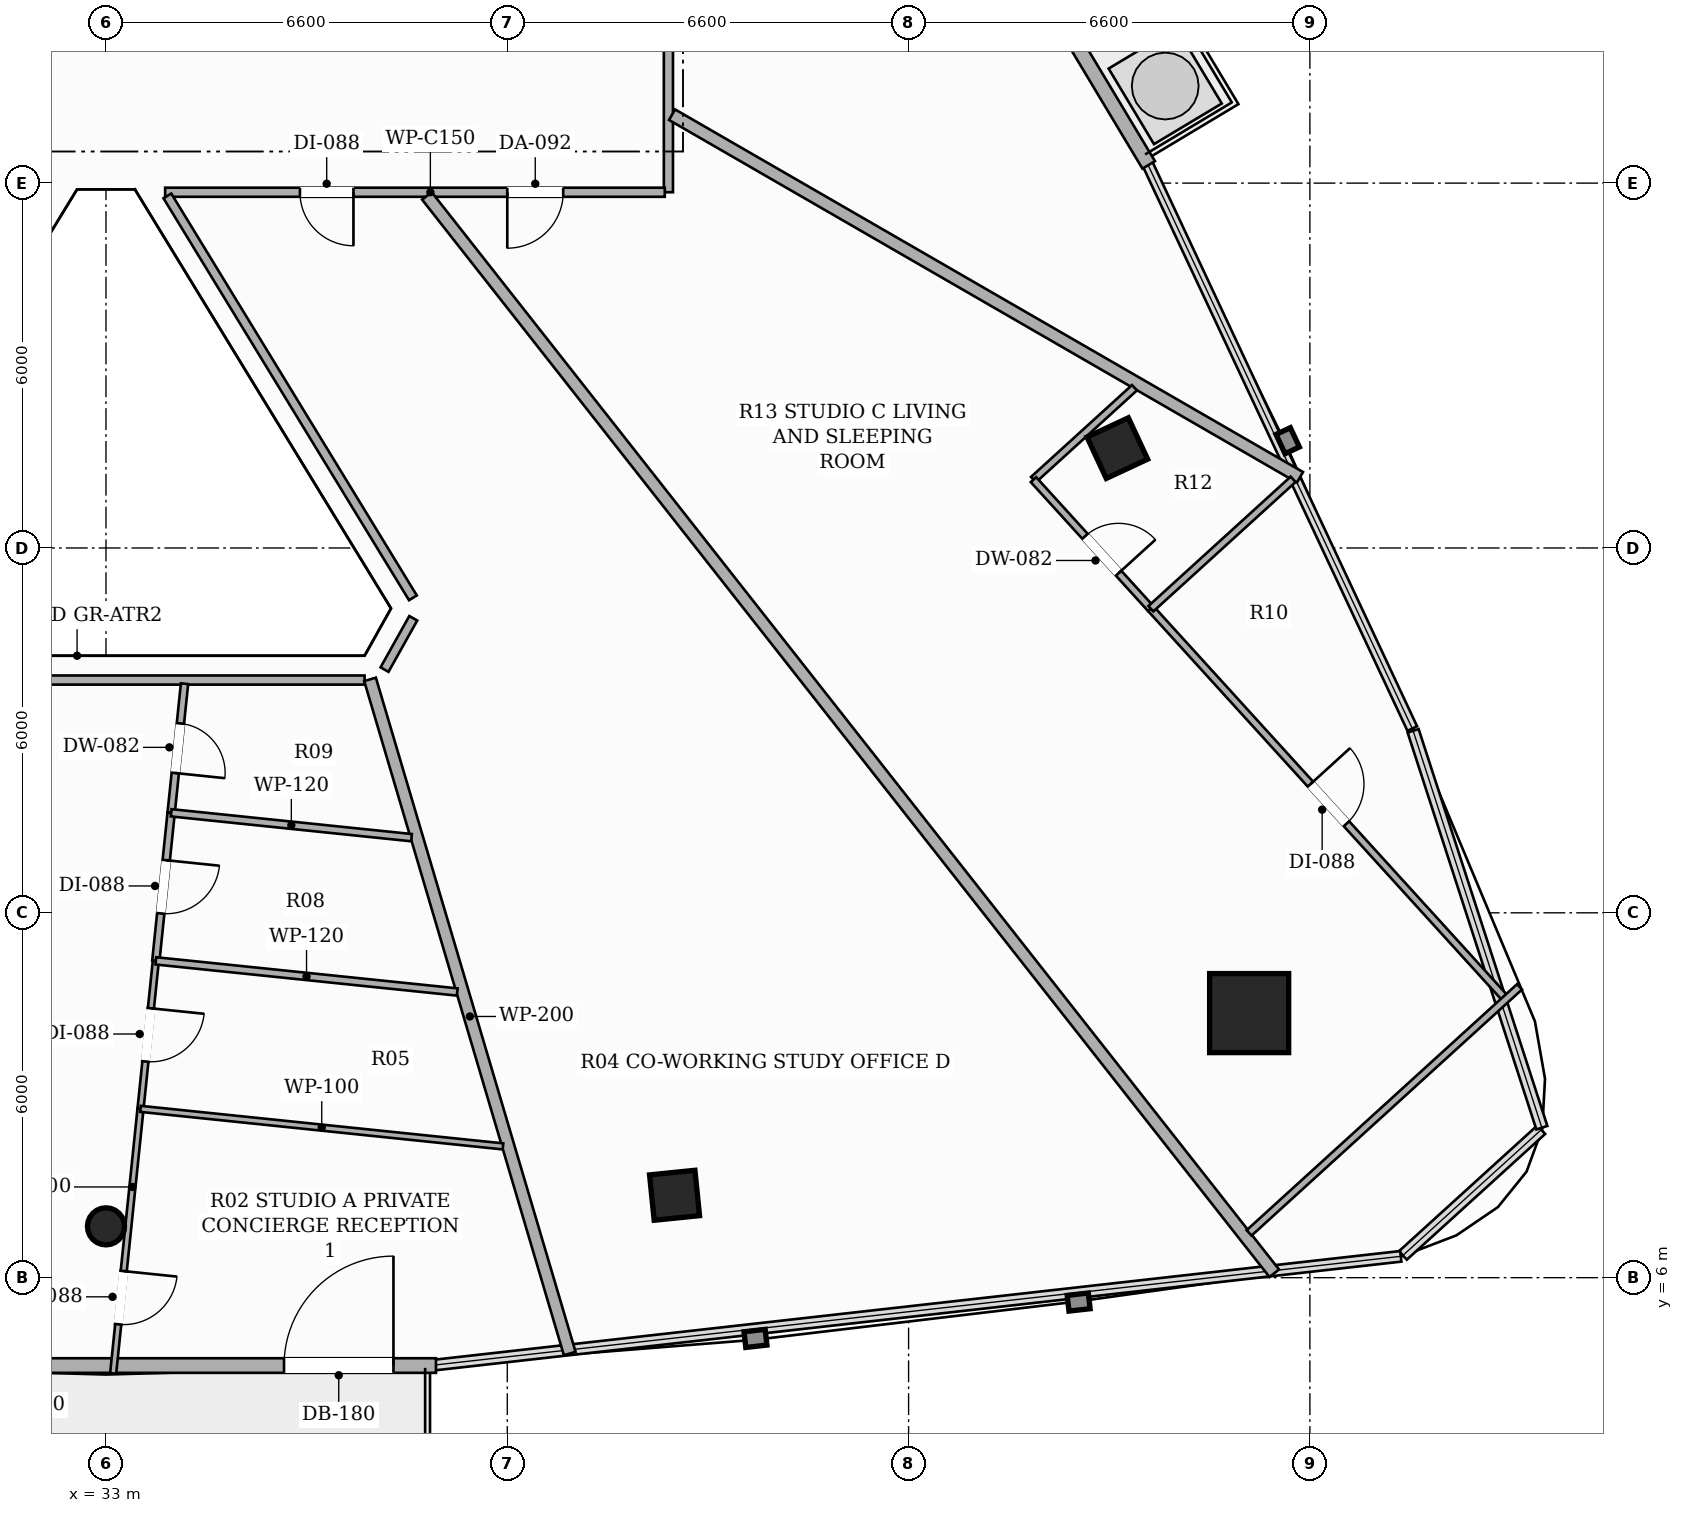
"""IFC4 building model, lengths in metres.
Left out: names, types, materials, properties, quantities, classifications, styles, units other than length and angle.
Written with IfcOpenShell. Run it as: python <this file> out.ifc"""

import sys

from ifc_helpers import new_model, si_unit, direction, frame, frame_2d, origin, origin_2d, place, context, subcontext, project, spatial, rectangle, hollow_rectangle, hollow_circle, extrude, element, fill, save


model = new_model("IFC4")
c1 = context("Model", 3, precision=1e-05, world=origin(), true_north=direction((0.0, 1.0)))
c2 = subcontext(c1, "Body", "Model", "MODEL_VIEW")
j1 = project(units=[si_unit("LENGTHUNIT", "METRE"), si_unit("PLANEANGLEUNIT", "RADIAN")], contexts=[c1])
p1 = place(None, origin())
s1 = spatial("IfcSite", under=j1, at=p1, CompositionType="ELEMENT")
p2 = place(p1, origin())
s2 = spatial("IfcBuilding", under=s1, at=p2, CompositionType="ELEMENT")
p3 = place(p2, frame((0.0, 0.0, 199.7)))
s3 = spatial("IfcBuildingStorey", under=s2, at=p3, CompositionType="ELEMENT", Elevation=199.7)
p4 = place(p3, frame((51.801, 10.351, 0.0), z_axis=(0.0, 0.0, 1.0), x_axis=(1.0, 0.0, 0.0)))
e1 = element("IfcColumn", 1, at=p4, inside=s3, PredefinedType="COLUMN", context=c2, shape_type="SweptSolid", body=[
    extrude(hollow_rectangle(XDim=1.3, YDim=1.3, WallThickness=0.04, at=origin_2d()), origin(), (0.0, 0.0, 1.0), 3.3),
])
p5 = place(p3, frame((33.0, 6.844, 0.0), z_axis=(0.0, 0.0, 1.0), x_axis=(1.0, 0.0, 0.0)))
e2 = element("IfcColumn", 2, at=p5, inside=s3, PredefinedType="COLUMN", context=c2, shape_type="SweptSolid", body=[
    extrude(hollow_circle(Radius=0.305, WallThickness=0.016, at=origin_2d()), origin(), (0.0, 0.0, 1.0), 3.3),
])
for number, where, z_axis, x_axis in (
    (3, (42.351, 7.355, 0.0), (0.0, 0.0, 1.0), (0.995, 0.101, 0.0)),
    (4, (49.633, 19.642, 0.0), (0.0, 0.0, 1.0), (-0.423, 0.906, 0.0)),
):
    element("IfcColumn", number, at=place(p3, frame(where, z_axis=z_axis, x_axis=x_axis)), inside=s3, PredefinedType="COLUMN", context=c2, shape_type="SweptSolid", body=[
        extrude(hollow_rectangle(XDim=0.75, YDim=0.75, WallThickness=0.025, at=origin_2d()), origin(), (0.0, 0.0, 1.0), 3.3),
    ])
p6 = place(p3, frame((27.573, 4.555, 0.0), z_axis=(0.0, 0.0, 1.0), x_axis=(1.0, 0.0, 0.0)))
e5 = element("IfcWall", 5, at=p6, inside=s3, PredefinedType="SOLIDWALL", context=c2, shape_type="SweptSolid", body=[
    extrude(rectangle(XDim=10.854, YDim=0.24, at=frame_2d((5.427, 0.0))), origin(), (0.0, 0.0, 1.0), 2.624),
])
p7 = place(p6, frame((8.355, 0.0, 0.0)))
e6 = element("IfcOpeningElement", 6, at=p7, cuts=e5, PredefinedType="OPENING", context=c2, shape_type="SweptSolid", body=[
    extrude(rectangle(XDim=1.8, YDim=2.2, at=frame_2d((0.9, 1.1))), frame((0.0, 0.13, 0.0), z_axis=(0.0, -1.0, 0.0), x_axis=(1.0, 0.0, 0.0)), (0.0, 0.0, 1.0), 0.26),
])
p8 = place(p3, frame((50.149, 24.3, 0.0), z_axis=(0.0, 0.0, 1.0), x_axis=(-0.514406779101, 0.857546305231, 0.0)))
e7 = element("IfcWall", 7, at=p8, inside=s3, PredefinedType="SOLIDWALL", context=c2, shape_type="SweptSolid", body=[
    extrude(rectangle(XDim=10.492, YDim=0.24, at=frame_2d((5.246, 0.0))), origin(), (0.0, 0.0, 1.0), 2.624),
])
p9 = place(p8, frame((7.994, 0.0, 0.0)))
e8 = element("IfcOpeningElement", 8, at=p9, cuts=e7, PredefinedType="OPENING", context=c2, shape_type="SweptSolid", body=[
    extrude(rectangle(XDim=1.8, YDim=2.2, at=frame_2d((0.9, 1.1))), frame((0.0, 0.13, 0.0), z_axis=(0.0, -1.0, 0.0), x_axis=(1.0, 0.0, 0.0)), (0.0, 0.0, 1.0), 0.26),
])
p10 = place(p3, frame((42.25, 26.59, 0.0), z_axis=(0.0, 0.0, 1.0), x_axis=(0.0, -1.0, 0.0)))
e9 = element("IfcWall", 9, at=p10, inside=s3, PredefinedType="PARTITIONING", context=c2, shape_type="SweptSolid", body=[
    extrude(rectangle(XDim=2.74, YDim=0.15, at=frame_2d((1.37, 0.0))), origin(), (0.0, 0.0, 1.0), 2.773),
])
p11 = place(p3, frame((42.19, 23.85, 0.0), z_axis=(0.0, 0.0, 1.0), x_axis=(-1.0, 0.0, 0.0)))
e10 = element("IfcWall", 10, at=p11, inside=s3, PredefinedType="PARTITIONING", context=c2, shape_type="SweptSolid", body=[
    extrude(rectangle(XDim=8.217, YDim=0.15, at=frame_2d((4.108, 0.0))), origin(), (0.0, 0.0, 1.0), 2.565),
])
p12 = place(p11, frame((1.67, 0.0, 0.0)))
e11 = element("IfcOpeningElement", 11, at=p12, cuts=e10, PredefinedType="OPENING", context=c2, shape_type="SweptSolid", body=[
    extrude(rectangle(XDim=0.92, YDim=2.15, at=frame_2d((0.46, 1.075))), frame((0.0, 0.085, 0.0), z_axis=(0.0, -1.0, 0.0), x_axis=(1.0, 0.0, 0.0)), (0.0, 0.0, 1.0), 0.17),
])
p13 = place(p11, frame((5.12, 0.0, 0.0)))
e12 = element("IfcOpeningElement", 12, at=p13, cuts=e10, PredefinedType="OPENING", context=c2, shape_type="SweptSolid", body=[
    extrude(rectangle(XDim=0.88, YDim=2.1, at=frame_2d((0.44, 1.05))), frame((0.0, 0.085, 0.0), z_axis=(0.0, -1.0, 0.0), x_axis=(1.0, 0.0, 0.0)), (0.0, 0.0, 1.0), 0.17),
])
p14 = place(p3, frame((34.01, 23.79, 0.0), z_axis=(0.0, 0.0, 1.0), x_axis=(0.521316137909, -0.853363629618, 0.0)))
e13 = element("IfcWall", 13, at=p14, inside=s3, PredefinedType="PARTITIONING", context=c2, shape_type="SweptSolid", body=[
    extrude(rectangle(XDim=7.746, YDim=0.15, at=frame_2d((3.873, 0.0))), origin(), (0.0, 0.0, 1.0), 2.773),
])
p15 = place(p3, frame((38.054, 16.844, 0.0), z_axis=(0.0, 0.0, 1.0), x_axis=(-0.488810833005, -0.872389803664, 0.0)))
e14 = element("IfcWall", 14, at=p15, inside=s3, PredefinedType="PARTITIONING", context=c2, shape_type="SweptSolid", body=[
    extrude(rectangle(XDim=0.968, YDim=0.15, at=frame_2d((0.484, 0.0))), origin(), (0.0, 0.0, 1.0), 3.06),
])
p16 = place(p3, frame((37.253, 15.828, 0.0), z_axis=(0.0, 0.0, 1.0), x_axis=(-1.0, 0.0, 0.0)))
e15 = element("IfcWall", 15, at=p16, inside=s3, PredefinedType="PARTITIONING", context=c2, shape_type="SweptSolid", body=[
    extrude(rectangle(XDim=8.506, YDim=0.15, at=frame_2d((4.253, 0.0))), origin(), (0.0, 0.0, 1.0), 2.773),
])
p17 = place(p3, frame((37.343, 15.839, 0.0), z_axis=(0.0, 0.0, 1.0), x_axis=(0.28399703203, -0.958825159139, 0.0)))
e16 = element("IfcWall", 16, at=p17, inside=s3, PredefinedType="PARTITIONING", context=c2, shape_type="SweptSolid", body=[
    extrude(rectangle(XDim=11.563, YDim=0.2, at=frame_2d((5.782, 0.0))), origin(), (0.0, 0.0, 1.0), 2.492),
])
p18 = place(p3, frame((52.214, 6.073, 0.0), z_axis=(0.0, 0.0, 1.0), x_axis=(-0.618246700658, 0.785984107425, 0.0)))
e17 = element("IfcWall", 17, at=p18, inside=s3, PredefinedType="PARTITIONING", context=c2, shape_type="SweptSolid", body=[
    extrude(rectangle(XDim=22.541, YDim=0.2, at=frame_2d((11.271, 0.0))), origin(), (0.0, 0.0, 1.0), 2.492),
])
p19 = place(p3, frame((42.31, 25.125, 0.0), z_axis=(0.0, 0.0, 1.0), x_axis=(0.866001812803, -0.500040858552, 0.0)))
e18 = element("IfcWall", 18, at=p19, inside=s3, PredefinedType="PARTITIONING", context=c2, shape_type="SweptSolid", body=[
    extrude(rectangle(XDim=11.925, YDim=0.2, at=frame_2d((5.962, 0.0))), origin(), (0.0, 0.0, 1.0), 2.492),
])
p20 = place(p3, frame((34.292, 15.768, 0.0), z_axis=(0.0, 0.0, 1.0), x_axis=(-0.103059151492, -0.994675229054, 0.0)))
e19 = element("IfcWall", 19, at=p20, inside=s3, PredefinedType="PARTITIONING", context=c2, shape_type="SweptSolid", body=[
    extrude(rectangle(XDim=2.135, YDim=0.12, at=frame_2d((1.067, 0.0))), origin(), (0.0, 0.0, 1.0), 3.06),
])
p21 = place(p20, frame((0.657, 0.0, 0.0)))
e20 = element("IfcOpeningElement", 20, at=p21, cuts=e19, PredefinedType="OPENING", context=c2, shape_type="SweptSolid", body=[
    extrude(rectangle(XDim=0.82, YDim=2.1, at=frame_2d((0.41, 1.05))), frame((0.0, 0.07, 0.0), z_axis=(0.0, -1.0, 0.0), x_axis=(1.0, 0.0, 0.0)), (0.0, 0.0, 1.0), 0.14),
])
p22 = place(p3, frame((34.072, 13.645, 0.0), z_axis=(0.0, 0.0, 1.0), x_axis=(-0.102919566026, -0.994689681724, 0.0)))
e21 = element("IfcWall", 21, at=p22, inside=s3, PredefinedType="PARTITIONING", context=c2, shape_type="SweptSolid", body=[
    extrude(rectangle(XDim=2.448, YDim=0.12, at=frame_2d((1.224, 0.0))), origin(), (0.0, 0.0, 1.0), 3.06),
])
p23 = place(p22, frame((0.784, 0.0, 0.0)))
e22 = element("IfcOpeningElement", 22, at=p23, cuts=e21, PredefinedType="OPENING", context=c2, shape_type="SweptSolid", body=[
    extrude(rectangle(XDim=0.88, YDim=2.1, at=frame_2d((0.44, 1.05))), frame((0.0, 0.07, 0.0), z_axis=(0.0, -1.0, 0.0), x_axis=(1.0, 0.0, 0.0)), (0.0, 0.0, 1.0), 0.14),
])
p24 = place(p3, frame((33.568, 8.776, 0.0), z_axis=(0.0, 0.0, 1.0), x_axis=(-0.1029239069, -0.994689232569, 0.0)))
e23 = element("IfcWall", 23, at=p24, inside=s3, PredefinedType="PARTITIONING", context=c2, shape_type="SweptSolid", body=[
    extrude(rectangle(XDim=4.374, YDim=0.1, at=frame_2d((2.187, 0.0))), origin(), (0.0, 0.0, 1.0), 2.492),
])
p25 = place(p24, frame((2.682, 0.0, 0.0)))
e24 = element("IfcOpeningElement", 24, at=p25, cuts=e23, PredefinedType="OPENING", context=c2, shape_type="SweptSolid", body=[
    extrude(rectangle(XDim=0.88, YDim=2.1, at=frame_2d((0.44, 1.05))), frame((0.0, 0.06, 0.0), z_axis=(0.0, -1.0, 0.0), x_axis=(1.0, 0.0, 0.0)), (0.0, 0.0, 1.0), 0.12),
])
p26 = place(p3, frame((33.82, 11.21, 0.0), z_axis=(0.0, 0.0, 1.0), x_axis=(-0.102960420087, -0.994685453747, 0.0)))
e25 = element("IfcWall", 25, at=p26, inside=s3, PredefinedType="PARTITIONING", context=c2, shape_type="SweptSolid", body=[
    extrude(rectangle(XDim=2.447, YDim=0.1, at=frame_2d((1.224, 0.0))), origin(), (0.0, 0.0, 1.0), 3.06),
])
p27 = place(p26, frame((0.784, 0.0, 0.0)))
e26 = element("IfcOpeningElement", 26, at=p27, cuts=e25, PredefinedType="OPENING", context=c2, shape_type="SweptSolid", body=[
    extrude(rectangle(XDim=0.88, YDim=2.1, at=frame_2d((0.44, 1.05))), frame((0.0, 0.06, 0.0), z_axis=(0.0, -1.0, 0.0), x_axis=(1.0, 0.0, 0.0)), (0.0, 0.0, 1.0), 0.12),
])
p28 = place(p3, frame((38.025, 13.236, 0.0), z_axis=(0.0, 0.0, 1.0), x_axis=(-0.99469136016, 0.102903343108, 0.0)))
e27 = element("IfcWall", 27, at=p28, inside=s3, PredefinedType="PARTITIONING", context=c2, shape_type="SweptSolid", body=[
    extrude(rectangle(XDim=3.974, YDim=0.12, at=frame_2d((1.987, 0.0))), origin(), (0.0, 0.0, 1.0), 2.773),
])
p29 = place(p3, frame((38.777, 10.698, 0.0), z_axis=(0.0, 0.0, 1.0), x_axis=(-0.994708898019, 0.102733676081, 0.0)))
e28 = element("IfcWall", 28, at=p29, inside=s3, PredefinedType="PARTITIONING", context=c2, shape_type="SweptSolid", body=[
    extrude(rectangle(XDim=4.983, YDim=0.12, at=frame_2d((2.492, 0.0))), origin(), (0.0, 0.0, 1.0), 2.773),
])
p30 = place(p3, frame((33.568, 8.776, 0.0), z_axis=(0.0, 0.0, 1.0), x_axis=(0.994686760155, -0.102947798284, 0.0)))
e29 = element("IfcWall", 29, at=p30, inside=s3, PredefinedType="PARTITIONING", context=c2, shape_type="SweptSolid", body=[
    extrude(rectangle(XDim=5.993, YDim=0.1, at=frame_2d((2.996, 0.0))), origin(), (0.0, 0.0, 1.0), 2.773),
])
p31 = place(p3, frame((49.915, 20.635, 0.0), z_axis=(0.0, 0.0, 1.0), x_axis=(-0.739748179987, -0.672883816276, 0.0)))
e30 = element("IfcWall", 30, at=p31, inside=s3, PredefinedType="PARTITIONING", context=c2, shape_type="SweptSolid", body=[
    extrude(rectangle(XDim=2.246, YDim=0.12, at=frame_2d((1.123, 0.0))), origin(), (0.0, 0.0, 1.0), 2.492),
])
p32 = place(p3, frame((48.254, 19.124, 0.0), z_axis=(0.0, 0.0, 1.0), x_axis=(0.672884473084, -0.739747582546, 0.0)))
e31 = element("IfcWall", 31, at=p32, inside=s3, PredefinedType="PARTITIONING", context=c2, shape_type="SweptSolid", body=[
    extrude(rectangle(XDim=2.87, YDim=0.12, at=frame_2d((1.435, 0.0))), origin(), (0.0, 0.0, 1.0), 2.492),
])
p33 = place(p32, frame((1.26, 0.0, 0.0)))
e32 = element("IfcOpeningElement", 32, at=p33, cuts=e31, PredefinedType="OPENING", context=c2, shape_type="SweptSolid", body=[
    extrude(rectangle(XDim=0.82, YDim=2.1, at=frame_2d((0.41, 1.05))), frame((0.0, 0.07, 0.0), z_axis=(0.0, -1.0, 0.0), x_axis=(1.0, 0.0, 0.0)), (0.0, 0.0, 1.0), 0.14),
])
p34 = place(p3, frame((50.185, 17.001, 0.0), z_axis=(0.0, 0.0, 1.0), x_axis=(0.672902356661, -0.739731315005, 0.0)))
e33 = element("IfcWall", 33, at=p34, inside=s3, PredefinedType="PARTITIONING", context=c2, shape_type="SweptSolid", body=[
    extrude(rectangle(XDim=8.68, YDim=0.12, at=frame_2d((4.34, 0.0))), origin(), (0.0, 0.0, 1.0), 2.492),
])
p35 = place(p34, frame((3.9, 0.0, 0.0)))
e34 = element("IfcOpeningElement", 34, at=p35, cuts=e33, PredefinedType="OPENING", context=c2, shape_type="SweptSolid", body=[
    extrude(rectangle(XDim=0.88, YDim=2.1, at=frame_2d((0.44, 1.05))), frame((0.0, 0.07, 0.0), z_axis=(0.0, -1.0, 0.0), x_axis=(1.0, 0.0, 0.0)), (0.0, 0.0, 1.0), 0.14),
])
p36 = place(p3, frame((56.248, 10.783, 0.0), z_axis=(0.0, 0.0, 1.0), x_axis=(-0.739671804489, -0.672967771624, 0.0)))
e35 = element("IfcWall", 35, at=p36, inside=s3, PredefinedType="PARTITIONING", context=c2, shape_type="SweptSolid", body=[
    extrude(rectangle(XDim=6.013, YDim=0.12, at=frame_2d((3.007, 0.0))), origin(), (0.0, 0.0, 1.0), 3.06),
])
p37 = place(p3, frame((52.524, 19.129, 0.0), z_axis=(0.0, 0.0, 1.0), x_axis=(-0.739674496232, -0.672964813065, 0.0)))
e36 = element("IfcWall", 36, at=p37, inside=s3, PredefinedType="PARTITIONING", context=c2, shape_type="SweptSolid", body=[
    extrude(rectangle(XDim=3.162, YDim=0.12, at=frame_2d((1.581, 0.0))), origin(), (0.0, 0.0, 1.0), 2.492),
])
p38 = place(p7, origin())
e37 = element("IfcDoor", 37, at=p38, inside=s3, OperationType="SINGLE_SWING_RIGHT", PredefinedType="DOOR", context=c2, shape_type="SweptSolid", body=[
    extrude(rectangle(XDim=1.8, YDim=2.2, at=frame_2d((0.9, 1.1))), frame((0.0, 0.025, 0.0), z_axis=(0.0, -1.0, 0.0), x_axis=(1.0, 0.0, 0.0)), (0.0, 0.0, 1.0), 0.05),
])
fill(e6, e37)
p39 = place(p21, origin())
e38 = element("IfcDoor", 38, at=p39, inside=s3, OperationType="SINGLE_SWING_RIGHT", PredefinedType="DOOR", context=c2, shape_type="SweptSolid", body=[
    extrude(rectangle(XDim=0.82, YDim=2.1, at=frame_2d((0.41, 1.05))), frame((0.0, 0.025, 0.0), z_axis=(0.0, -1.0, 0.0), x_axis=(1.0, 0.0, 0.0)), (0.0, 0.0, 1.0), 0.05),
])
fill(e20, e38)
p40 = place(p23, origin())
e39 = element("IfcDoor", 39, at=p40, inside=s3, OperationType="SINGLE_SWING_LEFT", PredefinedType="DOOR", context=c2, shape_type="SweptSolid", body=[
    extrude(rectangle(XDim=0.88, YDim=2.1, at=frame_2d((0.44, 1.05))), frame((0.0, 0.025, 0.0), z_axis=(0.0, -1.0, 0.0), x_axis=(1.0, 0.0, 0.0)), (0.0, 0.0, 1.0), 0.05),
])
fill(e22, e39)
p41 = place(p25, origin())
e40 = element("IfcDoor", 40, at=p41, inside=s3, OperationType="SINGLE_SWING_LEFT", PredefinedType="DOOR", context=c2, shape_type="SweptSolid", body=[
    extrude(rectangle(XDim=0.88, YDim=2.1, at=frame_2d((0.44, 1.05))), frame((0.0, 0.025, 0.0), z_axis=(0.0, -1.0, 0.0), x_axis=(1.0, 0.0, 0.0)), (0.0, 0.0, 1.0), 0.05),
])
fill(e24, e40)
p42 = place(p27, origin())
e41 = element("IfcDoor", 41, at=p42, inside=s3, OperationType="SINGLE_SWING_LEFT", PredefinedType="DOOR", context=c2, shape_type="SweptSolid", body=[
    extrude(rectangle(XDim=0.88, YDim=2.1, at=frame_2d((0.44, 1.05))), frame((0.0, 0.025, 0.0), z_axis=(0.0, -1.0, 0.0), x_axis=(1.0, 0.0, 0.0)), (0.0, 0.0, 1.0), 0.05),
])
fill(e26, e41)
p43 = place(p12, origin())
e42 = element("IfcDoor", 42, at=p43, inside=s3, OperationType="SINGLE_SWING_RIGHT", PredefinedType="DOOR", context=c2, shape_type="SweptSolid", body=[
    extrude(rectangle(XDim=0.92, YDim=2.15, at=frame_2d((0.46, 1.075))), frame((0.0, 0.025, 0.0), z_axis=(0.0, -1.0, 0.0), x_axis=(1.0, 0.0, 0.0)), (0.0, 0.0, 1.0), 0.05),
])
fill(e11, e42)
p44 = place(p33, origin())
e43 = element("IfcDoor", 43, at=p44, inside=s3, OperationType="SINGLE_SWING_RIGHT", PredefinedType="DOOR", context=c2, shape_type="SweptSolid", body=[
    extrude(rectangle(XDim=0.82, YDim=2.1, at=frame_2d((0.41, 1.05))), frame((0.0, 0.025, 0.0), z_axis=(0.0, -1.0, 0.0), x_axis=(1.0, 0.0, 0.0)), (0.0, 0.0, 1.0), 0.05),
])
fill(e32, e43)
p45 = place(p35, origin())
e44 = element("IfcDoor", 44, at=p45, inside=s3, OperationType="SINGLE_SWING_LEFT", PredefinedType="DOOR", context=c2, shape_type="SweptSolid", body=[
    extrude(rectangle(XDim=0.88, YDim=2.1, at=frame_2d((0.44, 1.05))), frame((0.0, 0.025, 0.0), z_axis=(0.0, -1.0, 0.0), x_axis=(1.0, 0.0, 0.0)), (0.0, 0.0, 1.0), 0.05),
])
fill(e34, e44)
p46 = place(p13, origin())
e45 = element("IfcDoor", 45, at=p46, inside=s3, OperationType="SINGLE_SWING_LEFT", PredefinedType="DOOR", context=c2, shape_type="SweptSolid", body=[
    extrude(rectangle(XDim=0.88, YDim=2.1, at=frame_2d((0.44, 1.05))), frame((0.0, 0.025, 0.0), z_axis=(0.0, -1.0, 0.0), x_axis=(1.0, 0.0, 0.0)), (0.0, 0.0, 1.0), 0.05),
])
fill(e12, e45)
save(model, sys.argv[1])
